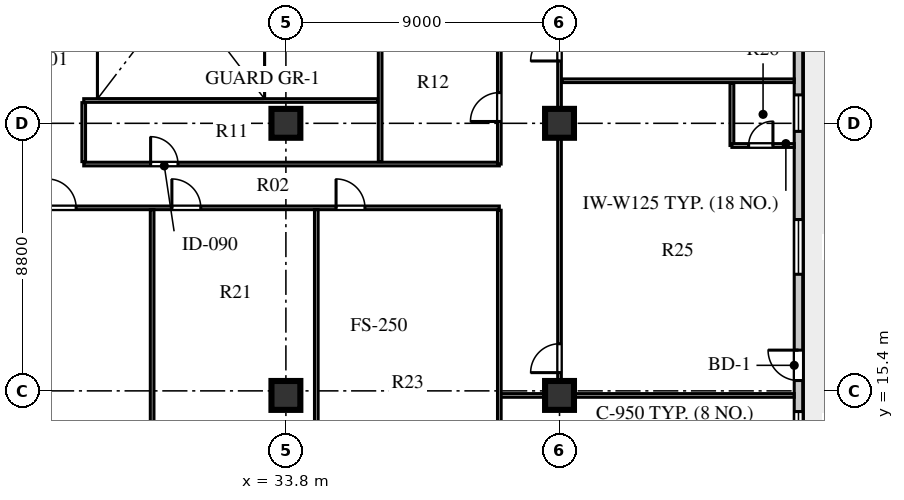
"""IFC4 building model, lengths in metres.
Left out: names, types, materials, properties, quantities, classifications, styles, units other than length and angle.
Written with IfcOpenShell. Run it as: python <this file> out.ifc"""

import sys

from ifc_helpers import new_model, si_unit, direction, frame, frame_2d, origin, origin_2d, place, context, subcontext, project, spatial, rectangle, extrude, element, fill, save


model = new_model("IFC4")
c1 = context("Model", 3, precision=1e-05, world=origin(), true_north=direction((0.0, 1.0)))
c2 = subcontext(c1, "Body", "Model", "MODEL_VIEW")
j1 = project(units=[si_unit("LENGTHUNIT", "METRE"), si_unit("PLANEANGLEUNIT", "RADIAN")], contexts=[c1])
p1 = place(None, origin())
s1 = spatial("IfcSite", under=j1, at=p1, CompositionType="ELEMENT")
p2 = place(p1, origin())
s2 = spatial("IfcBuilding", under=s1, at=p2, CompositionType="ELEMENT")
p3 = place(p2, frame((0.0, 0.0, 173.3)))
s3 = spatial("IfcBuildingStorey", under=s2, at=p3, CompositionType="ELEMENT", Elevation=173.3)
for number, where, z_axis, x_axis in (
    (1, (33.8, 15.25, 0.0), (0.0, 0.0, 1.0), (1.0, 0.0, 0.0)),
    (2, (33.8, 24.2, 0.0), (0.0, 0.0, 1.0), (1.0, 0.0, 0.0)),
    (3, (42.8, 15.25, 0.0), (0.0, 0.0, 1.0), (1.0, 0.0, 0.0)),
    (4, (42.8, 24.2, 0.0), (0.0, 0.0, 1.0), (1.0, 0.0, 0.0)),
):
    element("IfcColumn", number, at=place(p3, frame(where, z_axis=z_axis, x_axis=x_axis)), inside=s3, PredefinedType="COLUMN", context=c2, shape_type="SweptSolid", body=[
        extrude(rectangle(XDim=0.95, YDim=0.95, at=origin_2d()), origin(), (0.0, 0.0, 1.0), 3.6),
    ])
p4 = place(p3, frame((50.66, 13.13, 0.0), z_axis=(0.0, 0.0, 1.0), x_axis=(0.0, 1.0, 0.0)))
e5 = element("IfcWall", 5, at=p4, inside=s3, PredefinedType="STANDARD", context=c2, shape_type="SweptSolid", body=[
    extrude(rectangle(XDim=30.94, YDim=0.28, at=frame_2d((15.47, 0.0))), origin(), (0.0, 0.0, 1.0), 3.6),
])
p5 = place(p4, frame((0.64, 0.0, 0.8)))
e6 = element("IfcOpeningElement", 6, at=p5, cuts=e5, PredefinedType="OPENING", context=c2, shape_type="SweptSolid", body=[
    extrude(rectangle(XDim=0.95, YDim=1.65, at=frame_2d((0.475, 0.825))), frame((0.0, 0.15, 0.0), z_axis=(0.0, -1.0, 0.0), x_axis=(1.0, 0.0, 0.0)), (0.0, 0.0, 1.0), 0.3),
])
p6 = place(p4, frame((2.61, 0.0, 0.0)))
e7 = element("IfcOpeningElement", 7, at=p6, cuts=e5, PredefinedType="OPENING", context=c2, shape_type="SweptSolid", body=[
    extrude(rectangle(XDim=1.0, YDim=2.05, at=frame_2d((0.5, 1.025))), frame((0.0, 0.15, 0.0), z_axis=(0.0, -1.0, 0.0), x_axis=(1.0, 0.0, 0.0)), (0.0, 0.0, 1.0), 0.3),
])
p7 = place(p4, frame((6.105, 0.0, 0.8)))
e8 = element("IfcOpeningElement", 8, at=p7, cuts=e5, PredefinedType="OPENING", context=c2, shape_type="SweptSolid", body=[
    extrude(rectangle(XDim=1.8, YDim=2.0, at=frame_2d((0.9, 1.0))), frame((0.0, 0.15, 0.0), z_axis=(0.0, -1.0, 0.0), x_axis=(1.0, 0.0, 0.0)), (0.0, 0.0, 1.0), 0.3),
])
p8 = place(p4, frame((10.805, 0.0, 0.8)))
e9 = element("IfcOpeningElement", 9, at=p8, cuts=e5, PredefinedType="OPENING", context=c2, shape_type="SweptSolid", body=[
    extrude(rectangle(XDim=1.2, YDim=1.75, at=frame_2d((0.6, 0.875))), frame((0.0, 0.15, 0.0), z_axis=(0.0, -1.0, 0.0), x_axis=(1.0, 0.0, 0.0)), (0.0, 0.0, 1.0), 0.3),
])
p9 = place(p4, frame((18.93, 0.0, 0.8)))
e10 = element("IfcOpeningElement", 10, at=p9, cuts=e5, PredefinedType="OPENING", context=c2, shape_type="SweptSolid", body=[
    extrude(rectangle(XDim=1.2, YDim=1.75, at=frame_2d((0.6, 0.875))), frame((0.0, 0.15, 0.0), z_axis=(0.0, -1.0, 0.0), x_axis=(1.0, 0.0, 0.0)), (0.0, 0.0, 1.0), 0.3),
])
p10 = place(p4, frame((27.105, 0.0, 0.8)))
e11 = element("IfcOpeningElement", 11, at=p10, cuts=e5, PredefinedType="OPENING", context=c2, shape_type="SweptSolid", body=[
    extrude(rectangle(XDim=1.2, YDim=1.75, at=frame_2d((0.6, 0.875))), frame((0.0, 0.15, 0.0), z_axis=(0.0, -1.0, 0.0), x_axis=(1.0, 0.0, 0.0)), (0.0, 0.0, 1.0), 0.3),
])
p11 = place(p4, frame((29.35, 0.0, 0.8)))
e12 = element("IfcOpeningElement", 12, at=p11, cuts=e5, PredefinedType="OPENING", context=c2, shape_type="SweptSolid", body=[
    extrude(rectangle(XDim=0.95, YDim=1.65, at=frame_2d((0.475, 0.825))), frame((0.0, 0.15, 0.0), z_axis=(0.0, -1.0, 0.0), x_axis=(1.0, 0.0, 0.0)), (0.0, 0.0, 1.0), 0.3),
])
p12 = place(p3, frame((25.22, 21.42, 0.0), z_axis=(0.0, 0.0, 1.0), x_axis=(1.0, 0.0, 0.0)))
e13 = element("IfcWall", 13, at=p12, inside=s3, PredefinedType="PARTITIONING", context=c2, shape_type="SweptSolid", body=[
    extrude(rectangle(XDim=15.6, YDim=0.12, at=frame_2d((7.8, 0.0))), origin(), (0.0, 0.0, 1.0), 3.25),
])
p13 = place(p12, frame((0.73, 0.0, 0.0)))
e14 = element("IfcOpeningElement", 14, at=p13, cuts=e13, PredefinedType="OPENING", context=c2, shape_type="SweptSolid", body=[
    extrude(rectangle(XDim=0.95, YDim=2.1, at=frame_2d((0.475, 1.05))), frame((0.0, 0.07, 0.0), z_axis=(0.0, -1.0, 0.0), x_axis=(1.0, 0.0, 0.0)), (0.0, 0.0, 1.0), 0.14),
])
p14 = place(p12, frame((4.83, 0.0, 0.0)))
e15 = element("IfcOpeningElement", 15, at=p14, cuts=e13, PredefinedType="OPENING", context=c2, shape_type="SweptSolid", body=[
    extrude(rectangle(XDim=0.95, YDim=2.1, at=frame_2d((0.475, 1.05))), frame((0.0, 0.07, 0.0), z_axis=(0.0, -1.0, 0.0), x_axis=(1.0, 0.0, 0.0)), (0.0, 0.0, 1.0), 0.14),
])
p15 = place(p12, frame((10.23, 0.0, 0.0)))
e16 = element("IfcOpeningElement", 16, at=p15, cuts=e13, PredefinedType="OPENING", context=c2, shape_type="SweptSolid", body=[
    extrude(rectangle(XDim=0.95, YDim=2.1, at=frame_2d((0.475, 1.05))), frame((0.0, 0.07, 0.0), z_axis=(0.0, -1.0, 0.0), x_axis=(1.0, 0.0, 0.0)), (0.0, 0.0, 1.0), 0.14),
])
p16 = place(p3, frame((27.15, 22.86, 0.0), z_axis=(0.0, 0.0, 1.0), x_axis=(1.0, 0.0, 0.0)))
e17 = element("IfcWall", 17, at=p16, inside=s3, PredefinedType="PARTITIONING", context=c2, shape_type="SweptSolid", body=[
    extrude(rectangle(XDim=13.67, YDim=0.12, at=frame_2d((6.835, 0.0))), origin(), (0.0, 0.0, 1.0), 3.6),
])
p17 = place(p16, frame((2.2, 0.0, 0.0)))
e18 = element("IfcOpeningElement", 18, at=p17, cuts=e17, PredefinedType="OPENING", context=c2, shape_type="SweptSolid", body=[
    extrude(rectangle(XDim=0.9, YDim=2.08, at=frame_2d((0.45, 1.04))), frame((0.0, 0.07, 0.0), z_axis=(0.0, -1.0, 0.0), x_axis=(1.0, 0.0, 0.0)), (0.0, 0.0, 1.0), 0.14),
])
p18 = place(p3, frame((42.8, 15.25, 0.0), z_axis=(0.0, 0.0, 1.0), x_axis=(0.0, 1.0, 0.0)))
e19 = element("IfcWall", 19, at=p18, inside=s3, PredefinedType="PARTITIONING", context=c2, shape_type="SweptSolid", body=[
    extrude(rectangle(XDim=26.7, YDim=0.12, at=frame_2d((13.35, 0.0))), origin(), (0.0, 0.0, 1.0), 2.95),
])
p19 = place(p18, frame((0.75, 0.0, 0.0)))
e20 = element("IfcOpeningElement", 20, at=p19, cuts=e19, PredefinedType="OPENING", context=c2, shape_type="SweptSolid", body=[
    extrude(rectangle(XDim=0.95, YDim=2.1, at=frame_2d((0.475, 1.05))), frame((0.0, 0.07, 0.0), z_axis=(0.0, -1.0, 0.0), x_axis=(1.0, 0.0, 0.0)), (0.0, 0.0, 1.0), 0.14),
])
p20 = place(p18, frame((11.0, 0.0, 0.0)))
e21 = element("IfcOpeningElement", 21, at=p20, cuts=e19, PredefinedType="OPENING", context=c2, shape_type="SweptSolid", body=[
    extrude(rectangle(XDim=0.95, YDim=2.1, at=frame_2d((0.475, 1.05))), frame((0.0, 0.07, 0.0), z_axis=(0.0, -1.0, 0.0), x_axis=(1.0, 0.0, 0.0)), (0.0, 0.0, 1.0), 0.14),
])
p21 = place(p3, frame((40.82, 15.25, 0.0), z_axis=(0.0, 0.0, 1.0), x_axis=(1.0, 0.0, 0.0)))
e22 = element("IfcWall", 22, at=p21, inside=s3, PredefinedType="PARTITIONING", context=c2, shape_type="SweptSolid", body=[
    extrude(rectangle(XDim=9.7, YDim=0.12, at=frame_2d((4.85, 0.0))), origin(), (0.0, 0.0, 1.0), 2.95),
])
p22 = place(p3, frame((40.82, 22.86, 0.0), z_axis=(0.0, 0.0, 1.0), x_axis=(0.0, 1.0, 0.0)))
e23 = element("IfcWall", 23, at=p22, inside=s3, PredefinedType="PARTITIONING", context=c2, shape_type="SweptSolid", body=[
    extrude(rectangle(XDim=4.36, YDim=0.12, at=frame_2d((2.18, 0.0))), origin(), (0.0, 0.0, 1.0), 3.6),
])
p23 = place(p22, frame((1.4, 0.0, 0.0)))
e24 = element("IfcOpeningElement", 24, at=p23, cuts=e23, PredefinedType="OPENING", context=c2, shape_type="SweptSolid", body=[
    extrude(rectangle(XDim=0.95, YDim=2.1, at=frame_2d((0.475, 1.05))), frame((0.0, 0.07, 0.0), z_axis=(0.0, -1.0, 0.0), x_axis=(1.0, 0.0, 0.0)), (0.0, 0.0, 1.0), 0.14),
])
p24 = place(p3, frame((36.9, 22.94, 0.0), z_axis=(0.0, 0.0, 1.0), x_axis=(0.0, 1.0, 0.0)))
e25 = element("IfcWall", 25, at=p24, inside=s3, PredefinedType="PARTITIONING", context=c2, shape_type="SweptSolid", body=[
    extrude(rectangle(XDim=4.28, YDim=0.12, at=frame_2d((2.14, 0.0))), origin(), (0.0, 0.0, 1.0), 3.6),
])
p25 = place(p3, frame((27.15, 24.95, 0.0), z_axis=(0.0, 0.0, 1.0), x_axis=(1.0, 0.0, 0.0)))
e26 = element("IfcWall", 26, at=p25, inside=s3, PredefinedType="PARTITIONING", context=c2, shape_type="SweptSolid", body=[
    extrude(rectangle(XDim=9.67, YDim=0.12, at=frame_2d((4.835, 0.0))), origin(), (0.0, 0.0, 1.0), 3.05),
])
p26 = place(p3, frame((27.15, 22.94, 0.0), z_axis=(0.0, 0.0, 1.0), x_axis=(0.0, 1.0, 0.0)))
e27 = element("IfcWall", 27, at=p26, inside=s3, PredefinedType="PARTITIONING", context=c2, shape_type="SweptSolid", body=[
    extrude(rectangle(XDim=1.94, YDim=0.12, at=frame_2d((0.97, 0.0))), origin(), (0.0, 0.0, 1.0), 3.6),
])
p27 = place(p3, frame((40.82, 7.88, 0.0), z_axis=(0.0, 0.0, 1.0), x_axis=(0.0, 1.0, 0.0)))
e28 = element("IfcWall", 28, at=p27, inside=s3, PredefinedType="PARTITIONING", context=c2, shape_type="SweptSolid", body=[
    extrude(rectangle(XDim=13.46, YDim=0.12, at=frame_2d((6.73, 0.0))), origin(), (0.0, 0.0, 1.0), 3.6),
])
for number, where, z_axis, x_axis in (
    (29, (29.4, 7.88, 0.0), (0.0, 0.0, 1.0), (0.0, 1.0, 0.0)),
    (30, (34.8, 7.88, 0.0), (0.0, 0.0, 1.0), (0.0, 1.0, 0.0)),
):
    element("IfcWall", number, at=place(p3, frame(where, z_axis=z_axis, x_axis=x_axis)), inside=s3, PredefinedType="PARTITIONING", context=c2, shape_type="SweptSolid", body=[
        extrude(rectangle(XDim=13.48, YDim=0.12, at=frame_2d((6.74, 0.0))), origin(), (0.0, 0.0, 1.0), 3.6),
    ])
p28 = place(p3, frame((48.47, 23.47, 0.0), z_axis=(0.0, 0.0, 1.0), x_axis=(0.0, 1.0, 0.0)))
e31 = element("IfcWall", 31, at=p28, inside=s3, PredefinedType="PLUMBINGWALL", context=c2, shape_type="SweptSolid", body=[
    extrude(rectangle(XDim=2.05, YDim=0.125, at=frame_2d((1.025, 0.0))), origin(), (0.0, 0.0, 1.0), 3.6),
])
p29 = place(p3, frame((48.47, 23.47, 0.0), z_axis=(0.0, 0.0, 1.0), x_axis=(1.0, 0.0, 0.0)))
e32 = element("IfcWall", 32, at=p29, inside=s3, PredefinedType="PLUMBINGWALL", context=c2, shape_type="SweptSolid", body=[
    extrude(rectangle(XDim=2.05, YDim=0.125, at=frame_2d((1.025, 0.0))), origin(), (0.0, 0.0, 1.0), 3.6),
])
p30 = place(p29, frame((0.55, 0.0, 0.0)))
e33 = element("IfcOpeningElement", 33, at=p30, cuts=e32, PredefinedType="OPENING", context=c2, shape_type="SweptSolid", body=[
    extrude(rectangle(XDim=0.8, YDim=2.05, at=frame_2d((0.4, 1.025))), frame((0.0, 0.073, 0.0), z_axis=(0.0, -1.0, 0.0), x_axis=(1.0, 0.0, 0.0)), (0.0, 0.0, 1.0), 0.145),
])
p31 = place(p3, frame((42.88, 25.6, 0.0), z_axis=(0.0, 0.0, 1.0), x_axis=(1.0, 0.0, 0.0)))
e34 = element("IfcWall", 34, at=p31, inside=s3, PredefinedType="PARTITIONING", context=c2, shape_type="SweptSolid", body=[
    extrude(rectangle(XDim=7.64, YDim=0.12, at=frame_2d((3.82, 0.0))), origin(), (0.0, 0.0, 1.0), 3.6),
])
p32 = place(p5, origin())
e35 = element("IfcWindow", 35, at=p32, inside=s3, PartitioningType="SINGLE_PANEL", PredefinedType="WINDOW", context=c2, shape_type="SweptSolid", body=[
    extrude(rectangle(XDim=0.95, YDim=1.65, at=frame_2d((0.475, 0.825))), frame((0.0, 0.03, 0.0), z_axis=(0.0, -1.0, 0.0), x_axis=(1.0, 0.0, 0.0)), (0.0, 0.0, 1.0), 0.06),
])
fill(e6, e35)
p33 = place(p6, frame((1.0, 0.0, 0.0), z_axis=(0.0, 0.0, 1.0), x_axis=(-1.0, 0.0, 0.0)))
e36 = element("IfcDoor", 36, at=p33, inside=s3, OperationType="SINGLE_SWING_LEFT", PredefinedType="DOOR", context=c2, shape_type="SweptSolid", body=[
    extrude(rectangle(XDim=1.0, YDim=2.05, at=frame_2d((0.5, 1.025))), frame((0.0, 0.025, 0.0), z_axis=(0.0, -1.0, 0.0), x_axis=(1.0, 0.0, 0.0)), (0.0, 0.0, 1.0), 0.05),
])
fill(e7, e36)
p34 = place(p7, origin())
e37 = element("IfcWindow", 37, at=p34, inside=s3, PartitioningType="SINGLE_PANEL", PredefinedType="WINDOW", context=c2, shape_type="SweptSolid", body=[
    extrude(rectangle(XDim=1.8, YDim=2.0, at=frame_2d((0.9, 1.0))), frame((0.0, 0.03, 0.0), z_axis=(0.0, -1.0, 0.0), x_axis=(1.0, 0.0, 0.0)), (0.0, 0.0, 1.0), 0.06),
])
fill(e8, e37)
p35 = place(p8, origin())
e38 = element("IfcWindow", 38, at=p35, inside=s3, PartitioningType="SINGLE_PANEL", PredefinedType="WINDOW", context=c2, shape_type="SweptSolid", body=[
    extrude(rectangle(XDim=1.2, YDim=1.75, at=frame_2d((0.6, 0.875))), frame((0.0, 0.03, 0.0), z_axis=(0.0, -1.0, 0.0), x_axis=(1.0, 0.0, 0.0)), (0.0, 0.0, 1.0), 0.06),
])
fill(e9, e38)
p36 = place(p17, origin())
e39 = element("IfcDoor", 39, at=p36, inside=s3, OperationType="SINGLE_SWING_LEFT", PredefinedType="DOOR", context=c2, shape_type="SweptSolid", body=[
    extrude(rectangle(XDim=0.9, YDim=2.08, at=frame_2d((0.45, 1.04))), frame((0.0, 0.025, 0.0), z_axis=(0.0, -1.0, 0.0), x_axis=(1.0, 0.0, 0.0)), (0.0, 0.0, 1.0), 0.05),
])
fill(e18, e39)
p37 = place(p23, frame((0.95, 0.0, 0.0), z_axis=(0.0, 0.0, 1.0), x_axis=(-1.0, 0.0, 0.0)))
e40 = element("IfcDoor", 40, at=p37, inside=s3, OperationType="SINGLE_SWING_RIGHT", PredefinedType="DOOR", context=c2, shape_type="SweptSolid", body=[
    extrude(rectangle(XDim=0.95, YDim=2.1, at=frame_2d((0.475, 1.05))), frame((0.0, 0.025, 0.0), z_axis=(0.0, -1.0, 0.0), x_axis=(1.0, 0.0, 0.0)), (0.0, 0.0, 1.0), 0.05),
])
fill(e24, e40)
p38 = place(p13, frame((0.95, 0.0, 0.0), z_axis=(0.0, 0.0, 1.0), x_axis=(-1.0, 0.0, 0.0)))
e41 = element("IfcDoor", 41, at=p38, inside=s3, OperationType="SINGLE_SWING_RIGHT", PredefinedType="DOOR", context=c2, shape_type="SweptSolid", body=[
    extrude(rectangle(XDim=0.95, YDim=2.1, at=frame_2d((0.475, 1.05))), frame((0.0, 0.025, 0.0), z_axis=(0.0, -1.0, 0.0), x_axis=(1.0, 0.0, 0.0)), (0.0, 0.0, 1.0), 0.05),
])
fill(e14, e41)
p39 = place(p14, frame((0.95, 0.0, 0.0), z_axis=(0.0, 0.0, 1.0), x_axis=(-1.0, 0.0, 0.0)))
e42 = element("IfcDoor", 42, at=p39, inside=s3, OperationType="SINGLE_SWING_RIGHT", PredefinedType="DOOR", context=c2, shape_type="SweptSolid", body=[
    extrude(rectangle(XDim=0.95, YDim=2.1, at=frame_2d((0.475, 1.05))), frame((0.0, 0.025, 0.0), z_axis=(0.0, -1.0, 0.0), x_axis=(1.0, 0.0, 0.0)), (0.0, 0.0, 1.0), 0.05),
])
fill(e15, e42)
p40 = place(p15, frame((0.95, 0.0, 0.0), z_axis=(0.0, 0.0, 1.0), x_axis=(-1.0, 0.0, 0.0)))
e43 = element("IfcDoor", 43, at=p40, inside=s3, OperationType="SINGLE_SWING_RIGHT", PredefinedType="DOOR", context=c2, shape_type="SweptSolid", body=[
    extrude(rectangle(XDim=0.95, YDim=2.1, at=frame_2d((0.475, 1.05))), frame((0.0, 0.025, 0.0), z_axis=(0.0, -1.0, 0.0), x_axis=(1.0, 0.0, 0.0)), (0.0, 0.0, 1.0), 0.05),
])
fill(e16, e43)
p41 = place(p19, origin())
e44 = element("IfcDoor", 44, at=p41, inside=s3, OperationType="SINGLE_SWING_LEFT", PredefinedType="DOOR", context=c2, shape_type="SweptSolid", body=[
    extrude(rectangle(XDim=0.95, YDim=2.1, at=frame_2d((0.475, 1.05))), frame((0.0, 0.025, 0.0), z_axis=(0.0, -1.0, 0.0), x_axis=(1.0, 0.0, 0.0)), (0.0, 0.0, 1.0), 0.05),
])
fill(e20, e44)
p42 = place(p30, frame((0.8, 0.0, 0.0), z_axis=(0.0, 0.0, 1.0), x_axis=(-1.0, 0.0, 0.0)))
e45 = element("IfcDoor", 45, at=p42, inside=s3, OperationType="SINGLE_SWING_LEFT", PredefinedType="DOOR", context=c2, shape_type="SweptSolid", body=[
    extrude(rectangle(XDim=0.8, YDim=2.05, at=frame_2d((0.4, 1.025))), frame((0.0, 0.025, 0.0), z_axis=(0.0, -1.0, 0.0), x_axis=(1.0, 0.0, 0.0)), (0.0, 0.0, 1.0), 0.05),
])
fill(e33, e45)
p43 = place(p20, origin())
e46 = element("IfcDoor", 46, at=p43, inside=s3, OperationType="SINGLE_SWING_LEFT", PredefinedType="DOOR", context=c2, shape_type="SweptSolid", body=[
    extrude(rectangle(XDim=0.95, YDim=2.1, at=frame_2d((0.475, 1.05))), frame((0.0, 0.025, 0.0), z_axis=(0.0, -1.0, 0.0), x_axis=(1.0, 0.0, 0.0)), (0.0, 0.0, 1.0), 0.05),
])
fill(e21, e46)
save(model, sys.argv[1])
